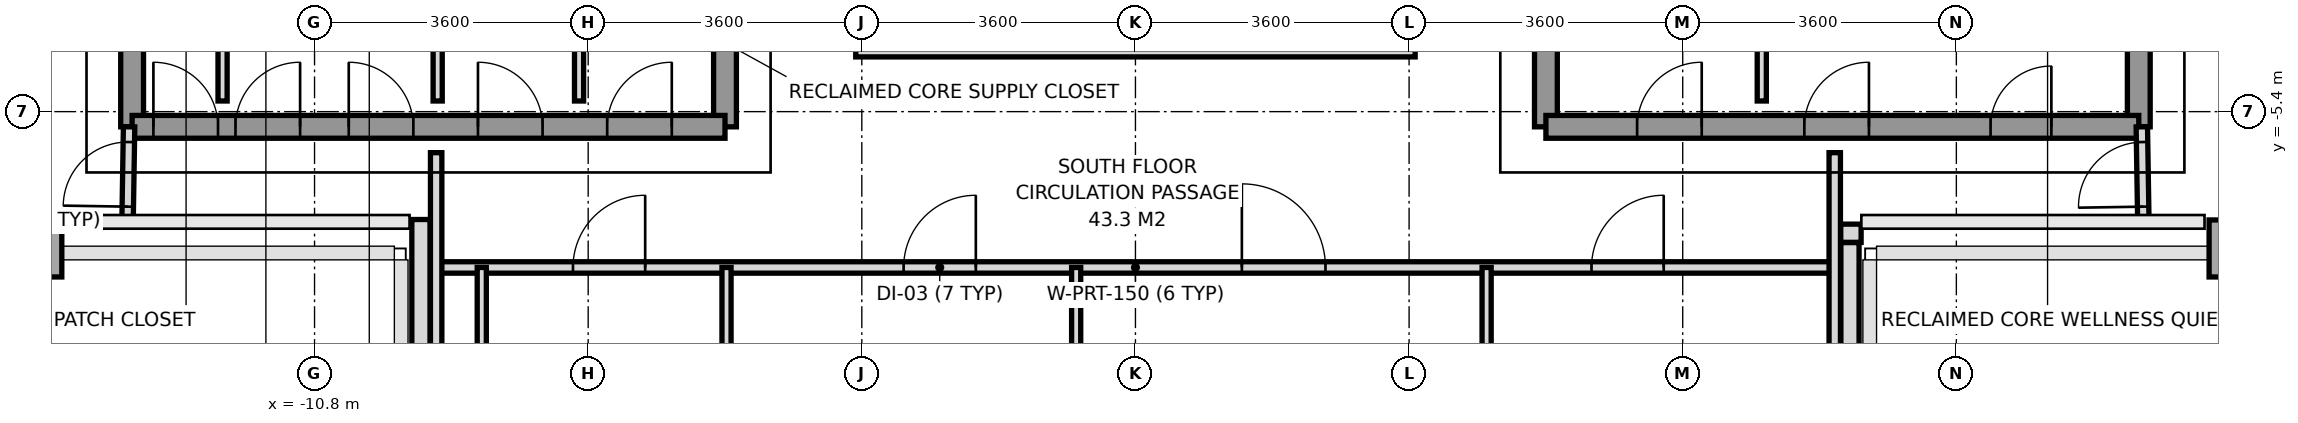
"""IFC4 building model, lengths in metres.
Left out: names, types, materials, properties, quantities, classifications, styles, units other than length and angle.
Written with IfcOpenShell. Run it as: python <this file> out.ifc"""

import sys

from ifc_helpers import new_model, si_unit, direction, frame, frame_2d, origin, origin_2d, place, context, subcontext, project, spatial, rectangle, extrude, source, transform, mapped, element, fill, save


model = new_model("IFC4")
c1 = context("Model", 3, precision=1e-05, world=origin(), true_north=direction((0.0, 1.0)))
c2 = subcontext(c1, "Body", "Model", "MODEL_VIEW")
j1 = project(units=[si_unit("LENGTHUNIT", "METRE"), si_unit("PLANEANGLEUNIT", "RADIAN")], contexts=[c1])
p1 = place(None, origin())
s1 = spatial("IfcSite", under=j1, at=p1, CompositionType="ELEMENT")
p2 = place(p1, origin())
s2 = spatial("IfcBuilding", under=s1, at=p2, CompositionType="ELEMENT")
p3 = place(p2, frame((0.0, 0.0, 226.8)))
s3 = spatial("IfcBuildingStorey", under=s2, at=p3, CompositionType="ELEMENT", Elevation=226.8)
m1 = source(origin(), c2, "Body", "SweptSolid", [
    extrude(rectangle(XDim=0.55, YDim=0.75, at=origin_2d()), origin(), (0.0, 0.0, 1.0), 3.01),
])
for number, where, z_axis, x_axis in (
    (1, (-14.4, -7.2, 0.0), (0.0, 0.0, 1.0), (1.0, 0.0, 0.0)),
    (2, (14.4, -7.2, 0.0), (0.0, 0.0, 1.0), (1.0, 0.0, 0.0)),
):
    element("IfcColumn", number, at=place(p3, frame(where, z_axis=z_axis, x_axis=x_axis)), inside=s3, PredefinedType="COLUMN", context=c2, shape_type="MappedRepresentation", body=[
        mapped(m1, transform((0.0, 0.0, 0.0), x_axis=(1.0, 0.0, 0.0), y_axis=(0.0, 1.0, 0.0), z_axis=(0.0, 0.0, 1.0), scale=1.0)),
    ])
p4 = place(p3, frame((9.547, -7.0, 0.0), z_axis=(0.0, 0.0, 1.0), x_axis=(-1.0, 0.0, 0.0)))
e3 = element("IfcWall", 3, at=p4, inside=s3, PredefinedType="PARAPET", context=c2, shape_type="SweptSolid", body=[
    extrude(rectangle(XDim=0.269, YDim=0.24, at=frame_2d((0.135, 0.0))), origin(), (0.0, 0.0, 1.0), 1.15),
])
p5 = place(p3, frame((9.4, -7.123, 0.0), z_axis=(0.0, 0.0, 1.0), x_axis=(0.0, -1.0, 0.0)))
e4 = element("IfcWall", 4, at=p5, inside=s3, PredefinedType="PARAPET", context=c2, shape_type="SweptSolid", body=[
    extrude(rectangle(XDim=1.499, YDim=0.24, at=frame_2d((0.75, 0.0))), origin(), (0.0, 0.0, 1.0), 1.15),
])
p6 = place(p3, frame((-9.4, -8.622, 0.0), z_axis=(0.0, 0.0, 1.0), x_axis=(0.0, 1.0, 0.0)))
e5 = element("IfcWall", 5, at=p6, inside=s3, PredefinedType="PARAPET", context=c2, shape_type="SweptSolid", body=[
    extrude(rectangle(XDim=1.803, YDim=0.24, at=frame_2d((0.901, 0.0))), origin(), (0.0, 0.0, 1.0), 1.15),
])
p7 = place(p3, frame((-13.2, -5.6, 0.0), z_axis=(0.0, 0.0, 1.0), x_axis=(0.0, 1.0, 0.0)))
e6 = element("IfcWall", 6, at=p7, inside=s3, PredefinedType="SHEAR", context=c2, shape_type="SweptSolid", body=[
    extrude(rectangle(XDim=11.2, YDim=0.3, at=frame_2d((5.6, 0.0))), origin(), (0.0, 0.0, 1.0), 3.01),
])
p8 = place(p3, frame((-5.4, -5.6, 0.0), z_axis=(0.0, 0.0, 1.0), x_axis=(0.0, 1.0, 0.0)))
e7 = element("IfcWall", 7, at=p8, inside=s3, PredefinedType="SHEAR", context=c2, shape_type="SweptSolid", body=[
    extrude(rectangle(XDim=12.5, YDim=0.3, at=frame_2d((6.25, 0.0))), origin(), (0.0, 0.0, 1.0), 3.01),
])
p9 = place(p8, frame((4.55, 0.0, 0.0)))
e8 = element("IfcOpeningElement", 8, at=p9, cuts=e7, PredefinedType="OPENING", context=c2, shape_type="SweptSolid", body=[
    extrude(rectangle(XDim=1.2, YDim=2.2, at=frame_2d((0.6, 1.1))), frame((0.0, 0.16, 0.0), z_axis=(0.0, -1.0, 0.0), x_axis=(1.0, 0.0, 0.0)), (0.0, 0.0, 1.0), 0.32),
])
p10 = place(p8, frame((10.45, 0.0, 0.0)))
e9 = element("IfcOpeningElement", 9, at=p10, cuts=e7, PredefinedType="OPENING", context=c2, shape_type="SweptSolid", body=[
    extrude(rectangle(XDim=1.2, YDim=2.2, at=frame_2d((0.6, 1.1))), frame((0.0, 0.16, 0.0), z_axis=(0.0, -1.0, 0.0), x_axis=(1.0, 0.0, 0.0)), (0.0, 0.0, 1.0), 0.32),
])
p11 = place(p8, frame((6.86, 0.0, 0.0)))
e10 = element("IfcOpeningElement", 10, at=p11, cuts=e7, PredefinedType="OPENING", context=c2, shape_type="SweptSolid", body=[
    extrude(rectangle(XDim=0.8, YDim=2.1, at=frame_2d((0.4, 1.05))), frame((0.0, 0.16, 0.0), z_axis=(0.0, -1.0, 0.0), x_axis=(1.0, 0.0, 0.0)), (0.0, 0.0, 1.0), 0.32),
])
p12 = place(p3, frame((-13.2, -5.6, 0.0), z_axis=(0.0, 0.0, 1.0), x_axis=(1.0, 0.0, 0.0)))
e11 = element("IfcWall", 11, at=p12, inside=s3, PredefinedType="SHEAR", context=c2, shape_type="SweptSolid", body=[
    extrude(rectangle(XDim=7.8, YDim=0.3, at=frame_2d((3.9, 0.0))), origin(), (0.0, 0.0, 1.0), 3.01),
])
p13 = place(p12, frame((0.28, 0.0, 0.0)))
e12 = element("IfcOpeningElement", 12, at=p13, cuts=e11, PredefinedType="OPENING", context=c2, shape_type="SweptSolid", body=[
    extrude(rectangle(XDim=0.85, YDim=2.1, at=frame_2d((0.425, 1.05))), frame((0.0, 0.16, 0.0), z_axis=(0.0, -1.0, 0.0), x_axis=(1.0, 0.0, 0.0)), (0.0, 0.0, 1.0), 0.32),
])
p14 = place(p12, frame((1.36, 0.0, 0.0)))
e13 = element("IfcOpeningElement", 13, at=p14, cuts=e11, PredefinedType="OPENING", context=c2, shape_type="SweptSolid", body=[
    extrude(rectangle(XDim=0.85, YDim=2.1, at=frame_2d((0.425, 1.05))), frame((0.0, 0.16, 0.0), z_axis=(0.0, -1.0, 0.0), x_axis=(1.0, 0.0, 0.0)), (0.0, 0.0, 1.0), 0.32),
])
p15 = place(p12, frame((2.85, 0.0, 0.0)))
e14 = element("IfcOpeningElement", 14, at=p15, cuts=e11, PredefinedType="OPENING", context=c2, shape_type="SweptSolid", body=[
    extrude(rectangle(XDim=0.85, YDim=2.1, at=frame_2d((0.425, 1.05))), frame((0.0, 0.16, 0.0), z_axis=(0.0, -1.0, 0.0), x_axis=(1.0, 0.0, 0.0)), (0.0, 0.0, 1.0), 0.32),
])
p16 = place(p12, frame((4.55, 0.0, 0.0)))
e15 = element("IfcOpeningElement", 15, at=p16, cuts=e11, PredefinedType="OPENING", context=c2, shape_type="SweptSolid", body=[
    extrude(rectangle(XDim=0.85, YDim=2.1, at=frame_2d((0.425, 1.05))), frame((0.0, 0.16, 0.0), z_axis=(0.0, -1.0, 0.0), x_axis=(1.0, 0.0, 0.0)), (0.0, 0.0, 1.0), 0.32),
])
p17 = place(p12, frame((6.25, 0.0, 0.0)))
e16 = element("IfcOpeningElement", 16, at=p17, cuts=e11, PredefinedType="OPENING", context=c2, shape_type="SweptSolid", body=[
    extrude(rectangle(XDim=0.85, YDim=2.1, at=frame_2d((0.425, 1.05))), frame((0.0, 0.16, 0.0), z_axis=(0.0, -1.0, 0.0), x_axis=(1.0, 0.0, 0.0)), (0.0, 0.0, 1.0), 0.32),
])
p18 = place(p3, frame((13.2, -5.6, 0.0), z_axis=(0.0, 0.0, 1.0), x_axis=(0.0, 1.0, 0.0)))
e17 = element("IfcWall", 17, at=p18, inside=s3, PredefinedType="SHEAR", context=c2, shape_type="SweptSolid", body=[
    extrude(rectangle(XDim=11.2, YDim=0.3, at=frame_2d((5.6, 0.0))), origin(), (0.0, 0.0, 1.0), 3.01),
])
p19 = place(p3, frame((5.4, -5.6, 0.0), z_axis=(0.0, 0.0, 1.0), x_axis=(0.0, 1.0, 0.0)))
e18 = element("IfcWall", 18, at=p19, inside=s3, PredefinedType="SHEAR", context=c2, shape_type="SweptSolid", body=[
    extrude(rectangle(XDim=12.5, YDim=0.3, at=frame_2d((6.25, 0.0))), origin(), (0.0, 0.0, 1.0), 3.01),
])
p20 = place(p19, frame((4.55, 0.0, 0.0)))
e19 = element("IfcOpeningElement", 19, at=p20, cuts=e18, PredefinedType="OPENING", context=c2, shape_type="SweptSolid", body=[
    extrude(rectangle(XDim=1.2, YDim=2.2, at=frame_2d((0.6, 1.1))), frame((0.0, 0.16, 0.0), z_axis=(0.0, -1.0, 0.0), x_axis=(1.0, 0.0, 0.0)), (0.0, 0.0, 1.0), 0.32),
])
p21 = place(p19, frame((10.45, 0.0, 0.0)))
e20 = element("IfcOpeningElement", 20, at=p21, cuts=e18, PredefinedType="OPENING", context=c2, shape_type="SweptSolid", body=[
    extrude(rectangle(XDim=1.2, YDim=2.2, at=frame_2d((0.6, 1.1))), frame((0.0, 0.16, 0.0), z_axis=(0.0, -1.0, 0.0), x_axis=(1.0, 0.0, 0.0)), (0.0, 0.0, 1.0), 0.32),
])
p22 = place(p19, frame((6.86, 0.0, 0.0)))
e21 = element("IfcOpeningElement", 21, at=p22, cuts=e18, PredefinedType="OPENING", context=c2, shape_type="SweptSolid", body=[
    extrude(rectangle(XDim=0.8, YDim=2.1, at=frame_2d((0.4, 1.05))), frame((0.0, 0.16, 0.0), z_axis=(0.0, -1.0, 0.0), x_axis=(1.0, 0.0, 0.0)), (0.0, 0.0, 1.0), 0.32),
])
p23 = place(p19, frame((7.88, 0.0, 0.0)))
e22 = element("IfcOpeningElement", 22, at=p23, cuts=e18, PredefinedType="OPENING", context=c2, shape_type="SweptSolid", body=[
    extrude(rectangle(XDim=0.8, YDim=2.1, at=frame_2d((0.4, 1.05))), frame((0.0, 0.16, 0.0), z_axis=(0.0, -1.0, 0.0), x_axis=(1.0, 0.0, 0.0)), (0.0, 0.0, 1.0), 0.32),
])
p24 = place(p3, frame((5.4, -5.6, 0.0), z_axis=(0.0, 0.0, 1.0), x_axis=(1.0, 0.0, 0.0)))
e23 = element("IfcWall", 23, at=p24, inside=s3, PredefinedType="SHEAR", context=c2, shape_type="SweptSolid", body=[
    extrude(rectangle(XDim=7.8, YDim=0.3, at=frame_2d((3.9, 0.0))), origin(), (0.0, 0.0, 1.0), 3.01),
])
p25 = place(p24, frame((5.85, 0.0, 0.0)))
e24 = element("IfcOpeningElement", 24, at=p25, cuts=e23, PredefinedType="OPENING", context=c2, shape_type="SweptSolid", body=[
    extrude(rectangle(XDim=0.8, YDim=2.1, at=frame_2d((0.4, 1.05))), frame((0.0, 0.16, 0.0), z_axis=(0.0, -1.0, 0.0), x_axis=(1.0, 0.0, 0.0)), (0.0, 0.0, 1.0), 0.32),
])
p26 = place(p24, frame((1.2, 0.0, 0.0)))
e25 = element("IfcOpeningElement", 25, at=p26, cuts=e23, PredefinedType="OPENING", context=c2, shape_type="SweptSolid", body=[
    extrude(rectangle(XDim=0.85, YDim=2.1, at=frame_2d((0.425, 1.05))), frame((0.0, 0.16, 0.0), z_axis=(0.0, -1.0, 0.0), x_axis=(1.0, 0.0, 0.0)), (0.0, 0.0, 1.0), 0.32),
])
p27 = place(p24, frame((3.4, 0.0, 0.0)))
e26 = element("IfcOpeningElement", 26, at=p27, cuts=e23, PredefinedType="OPENING", context=c2, shape_type="SweptSolid", body=[
    extrude(rectangle(XDim=0.85, YDim=2.1, at=frame_2d((0.425, 1.05))), frame((0.0, 0.16, 0.0), z_axis=(0.0, -1.0, 0.0), x_axis=(1.0, 0.0, 0.0)), (0.0, 0.0, 1.0), 0.32),
])
for number, where, z_axis, x_axis in (
    (27, (-12.01, -5.26, 0.0), (0.0, 0.0, 1.0), (0.0, 1.0, 0.0)),
    (28, (-9.18, -5.26, 0.0), (0.0, 0.0, 1.0), (0.0, 1.0, 0.0)),
    (29, (-7.32, -5.26, 0.0), (0.0, 0.0, 1.0), (0.0, 1.0, 0.0)),
    (30, (8.24, -5.26, 0.0), (0.0, 0.0, 1.0), (0.0, 1.0, 0.0)),
):
    element("IfcWall", number, at=place(p3, frame(where, z_axis=z_axis, x_axis=x_axis)), inside=s3, PredefinedType="PARTITIONING", context=c2, shape_type="SweptSolid", body=[
        extrude(rectangle(XDim=2.94, YDim=0.12, at=frame_2d((1.47, 0.0))), origin(), (0.0, 0.0, 1.0), 3.01),
    ])
p28 = place(p3, frame((-9.2, -7.45, 0.0), z_axis=(0.0, 0.0, 1.0), x_axis=(1.0, 0.0, 0.0)))
e31 = element("IfcWall", 31, at=p28, inside=s3, PredefinedType="PARTITIONING", context=c2, shape_type="SweptSolid", body=[
    extrude(rectangle(XDim=18.4, YDim=0.15, at=frame_2d((9.2, 0.0))), origin(), (0.0, 0.0, 1.0), 2.57),
])
p29 = place(p28, frame((1.8, 0.0, 0.0)))
e32 = element("IfcOpeningElement", 32, at=p29, cuts=e31, PredefinedType="OPENING", context=c2, shape_type="SweptSolid", body=[
    extrude(rectangle(XDim=0.95, YDim=2.15, at=frame_2d((0.475, 1.075))), frame((0.0, 0.085, 0.0), z_axis=(0.0, -1.0, 0.0), x_axis=(1.0, 0.0, 0.0)), (0.0, 0.0, 1.0), 0.17),
])
p30 = place(p28, frame((6.15, 0.0, 0.0)))
e33 = element("IfcOpeningElement", 33, at=p30, cuts=e31, PredefinedType="OPENING", context=c2, shape_type="SweptSolid", body=[
    extrude(rectangle(XDim=0.95, YDim=2.15, at=frame_2d((0.475, 1.075))), frame((0.0, 0.085, 0.0), z_axis=(0.0, -1.0, 0.0), x_axis=(1.0, 0.0, 0.0)), (0.0, 0.0, 1.0), 0.17),
])
p31 = place(p28, frame((10.6, 0.0, 0.0)))
e34 = element("IfcOpeningElement", 34, at=p31, cuts=e31, PredefinedType="OPENING", context=c2, shape_type="SweptSolid", body=[
    extrude(rectangle(XDim=1.1, YDim=2.2, at=frame_2d((0.55, 1.1))), frame((0.0, 0.085, 0.0), z_axis=(0.0, -1.0, 0.0), x_axis=(1.0, 0.0, 0.0)), (0.0, 0.0, 1.0), 0.17),
])
p32 = place(p28, frame((15.2, 0.0, 0.0)))
e35 = element("IfcOpeningElement", 35, at=p32, cuts=e31, PredefinedType="OPENING", context=c2, shape_type="SweptSolid", body=[
    extrude(rectangle(XDim=0.95, YDim=2.15, at=frame_2d((0.475, 1.075))), frame((0.0, 0.085, 0.0), z_axis=(0.0, -1.0, 0.0), x_axis=(1.0, 0.0, 0.0)), (0.0, 0.0, 1.0), 0.17),
])
for number, where, z_axis, x_axis in (
    (36, (-9.2, -10.28, 0.0), (0.0, 0.0, 1.0), (0.0, 1.0, 0.0)),
    (37, (9.2, -10.28, 0.0), (0.0, 0.0, 1.0), (0.0, 1.0, 0.0)),
):
    element("IfcWall", number, at=place(p3, frame(where, z_axis=z_axis, x_axis=x_axis)), inside=s3, PredefinedType="PARTITIONING", context=c2, shape_type="SweptSolid", body=[
        extrude(rectangle(XDim=4.34, YDim=0.15, at=frame_2d((2.17, 0.0))), origin(), (0.0, 0.0, 1.0), 2.61),
    ])
p33 = place(p3, frame((-5.38, -19.25, 0.0), z_axis=(0.0, 0.0, 1.0), x_axis=(0.0, 1.0, 0.0)))
e38 = element("IfcWall", 38, at=p33, inside=s3, PredefinedType="PARTITIONING", context=c2, shape_type="SweptSolid", body=[
    extrude(rectangle(XDim=11.8, YDim=0.12, at=frame_2d((5.9, 0.0))), origin(), (0.0, 0.0, 1.0), 2.61),
])
p34 = place(p33, frame((3.2, 0.0, 0.0)))
e39 = element("IfcOpeningElement", 39, at=p34, cuts=e38, PredefinedType="OPENING", context=c2, shape_type="SweptSolid", body=[
    extrude(rectangle(XDim=0.95, YDim=2.15, at=frame_2d((0.475, 1.075))), frame((0.0, 0.07, 0.0), z_axis=(0.0, -1.0, 0.0), x_axis=(1.0, 0.0, 0.0)), (0.0, 0.0, 1.0), 0.14),
])
for number, where, z_axis, x_axis in (
    (40, (-0.78, -19.25, 0.0), (0.0, 0.0, 1.0), (0.0, 1.0, 0.0)),
    (41, (4.62, -19.25, 0.0), (0.0, 0.0, 1.0), (0.0, 1.0, 0.0)),
):
    element("IfcWall", number, at=place(p3, frame(where, z_axis=z_axis, x_axis=x_axis)), inside=s3, PredefinedType="PARTITIONING", context=c2, shape_type="SweptSolid", body=[
        extrude(rectangle(XDim=11.8, YDim=0.12, at=frame_2d((5.9, 0.0))), origin(), (0.0, 0.0, 1.0), 2.61),
    ])
p35 = place(p3, frame((-8.6, -11.05, 0.0), z_axis=(0.0, 0.0, 1.0), x_axis=(0.0, 1.0, 0.0)))
e42 = element("IfcWall", 42, at=p35, inside=s3, PredefinedType="PARTITIONING", context=c2, shape_type="SweptSolid", body=[
    extrude(rectangle(XDim=3.6, YDim=0.12, at=frame_2d((1.8, 0.0))), origin(), (0.0, 0.0, 1.0), 2.61),
])
p36 = place(p3, frame((-13.26, -6.85, 0.0), z_axis=(0.0, 0.0, 1.0), x_axis=(0.016013571389, 0.999871774545, 0.0)))
e43 = element("IfcWall", 43, at=p36, inside=s3, PredefinedType="PARTITIONING", context=c2, shape_type="SweptSolid", body=[
    extrude(rectangle(XDim=1.25, YDim=0.15, at=frame_2d((0.625, 0.0))), origin(), (0.0, 0.0, 1.0), 3.01),
])
p37 = place(p36, frame((0.2, 0.0, 0.0)))
e44 = element("IfcOpeningElement", 44, at=p37, cuts=e43, PredefinedType="OPENING", context=c2, shape_type="SweptSolid", body=[
    extrude(rectangle(XDim=0.85, YDim=2.1, at=frame_2d((0.425, 1.05))), frame((0.0, 0.085, 0.0), z_axis=(0.0, -1.0, 0.0), x_axis=(1.0, 0.0, 0.0)), (0.0, 0.0, 1.0), 0.17),
])
p38 = place(p3, frame((13.26, -6.85, 0.0), z_axis=(0.0, 0.0, 1.0), x_axis=(-0.016013571389, 0.999871774545, 0.0)))
e45 = element("IfcWall", 45, at=p38, inside=s3, PredefinedType="PARTITIONING", context=c2, shape_type="SweptSolid", body=[
    extrude(rectangle(XDim=1.25, YDim=0.15, at=frame_2d((0.625, 0.0))), origin(), (0.0, 0.0, 1.0), 3.01),
])
p39 = place(p38, frame((0.2, 0.0, 0.0)))
e46 = element("IfcOpeningElement", 46, at=p39, cuts=e45, PredefinedType="OPENING", context=c2, shape_type="SweptSolid", body=[
    extrude(rectangle(XDim=0.85, YDim=2.1, at=frame_2d((0.425, 1.05))), frame((0.0, 0.085, 0.0), z_axis=(0.0, -1.0, 0.0), x_axis=(1.0, 0.0, 0.0)), (0.0, 0.0, 1.0), 0.17),
])
p40 = place(p3, frame((-3.68, -4.56, 0.0), z_axis=(0.0, 0.0, 1.0), x_axis=(1.0, 0.0, 0.0)))
e47 = element("IfcWall", 47, at=p40, inside=s3, PredefinedType="PARAPET", context=c2, shape_type="SweptSolid", body=[
    extrude(rectangle(XDim=7.36, YDim=0.24, at=frame_2d((3.68, 0.0))), origin(), (0.0, 0.0, 1.0), 1.15),
])
m2 = source(origin(), c2, "Body", "SweptSolid", [
    extrude(rectangle(XDim=0.85, YDim=2.1, at=frame_2d((0.425, 1.05))), frame((0.0, 0.025, 0.0), z_axis=(0.0, -1.0, 0.0), x_axis=(1.0, 0.0, 0.0)), (0.0, 0.0, 1.0), 0.05),
])
p41 = place(p13, origin())
e48 = element("IfcDoor", 48, at=p41, inside=s3, OperationType="SINGLE_SWING_LEFT", PredefinedType="DOOR", context=c2, shape_type="MappedRepresentation", body=[
    mapped(m2, transform((0.0, 0.0, 0.0), x_axis=(1.0, 0.0, 0.0), y_axis=(0.0, 1.0, 0.0), z_axis=(0.0, 0.0, 1.0), scale=1.0)),
])
fill(e12, e48)
p42 = place(p14, origin())
e49 = element("IfcDoor", 49, at=p42, inside=s3, OperationType="SINGLE_SWING_RIGHT", PredefinedType="DOOR", context=c2, shape_type="MappedRepresentation", body=[
    mapped(m2, transform((0.0, 0.0, 0.0), x_axis=(1.0, 0.0, 0.0), y_axis=(0.0, 1.0, 0.0), z_axis=(0.0, 0.0, 1.0), scale=1.0)),
])
fill(e13, e49)
m3 = source(origin(), c2, "Body", "SweptSolid", [
    extrude(rectangle(XDim=0.8, YDim=2.1, at=frame_2d((0.4, 1.05))), frame((0.0, 0.025, 0.0), z_axis=(0.0, -1.0, 0.0), x_axis=(1.0, 0.0, 0.0)), (0.0, 0.0, 1.0), 0.05),
])
p43 = place(p25, origin())
e50 = element("IfcDoor", 50, at=p43, inside=s3, OperationType="SINGLE_SWING_RIGHT", PredefinedType="DOOR", context=c2, shape_type="MappedRepresentation", body=[
    mapped(m3, transform((0.0, 0.0, 0.0), x_axis=(1.0, 0.0, 0.0), y_axis=(0.0, 1.0, 0.0), z_axis=(0.0, 0.0, 1.0), scale=1.0)),
])
fill(e24, e50)
p44 = place(p15, origin())
e51 = element("IfcDoor", 51, at=p44, inside=s3, OperationType="SINGLE_SWING_LEFT", PredefinedType="DOOR", context=c2, shape_type="MappedRepresentation", body=[
    mapped(m2, transform((0.0, 0.0, 0.0), x_axis=(1.0, 0.0, 0.0), y_axis=(0.0, 1.0, 0.0), z_axis=(0.0, 0.0, 1.0), scale=1.0)),
])
fill(e14, e51)
p45 = place(p16, origin())
e52 = element("IfcDoor", 52, at=p45, inside=s3, OperationType="SINGLE_SWING_LEFT", PredefinedType="DOOR", context=c2, shape_type="MappedRepresentation", body=[
    mapped(m2, transform((0.0, 0.0, 0.0), x_axis=(1.0, 0.0, 0.0), y_axis=(0.0, 1.0, 0.0), z_axis=(0.0, 0.0, 1.0), scale=1.0)),
])
fill(e15, e52)
p46 = place(p17, origin())
e53 = element("IfcDoor", 53, at=p46, inside=s3, OperationType="SINGLE_SWING_RIGHT", PredefinedType="DOOR", context=c2, shape_type="MappedRepresentation", body=[
    mapped(m2, transform((0.0, 0.0, 0.0), x_axis=(1.0, 0.0, 0.0), y_axis=(0.0, 1.0, 0.0), z_axis=(0.0, 0.0, 1.0), scale=1.0)),
])
fill(e16, e53)
p47 = place(p26, origin())
e54 = element("IfcDoor", 54, at=p47, inside=s3, OperationType="SINGLE_SWING_RIGHT", PredefinedType="DOOR", context=c2, shape_type="MappedRepresentation", body=[
    mapped(m2, transform((0.0, 0.0, 0.0), x_axis=(1.0, 0.0, 0.0), y_axis=(0.0, 1.0, 0.0), z_axis=(0.0, 0.0, 1.0), scale=1.0)),
])
fill(e25, e54)
p48 = place(p27, origin())
e55 = element("IfcDoor", 55, at=p48, inside=s3, OperationType="SINGLE_SWING_RIGHT", PredefinedType="DOOR", context=c2, shape_type="MappedRepresentation", body=[
    mapped(m2, transform((0.0, 0.0, 0.0), x_axis=(1.0, 0.0, 0.0), y_axis=(0.0, 1.0, 0.0), z_axis=(0.0, 0.0, 1.0), scale=1.0)),
])
fill(e26, e55)
m4 = source(origin(), c2, "Body", "SweptSolid", [
    extrude(rectangle(XDim=0.95, YDim=2.15, at=frame_2d((0.475, 1.075))), frame((0.0, 0.025, 0.0), z_axis=(0.0, -1.0, 0.0), x_axis=(1.0, 0.0, 0.0)), (0.0, 0.0, 1.0), 0.05),
])
p49 = place(p29, origin())
e56 = element("IfcDoor", 56, at=p49, inside=s3, OperationType="SINGLE_SWING_RIGHT", PredefinedType="DOOR", context=c2, shape_type="MappedRepresentation", body=[
    mapped(m4, transform((0.0, 0.0, 0.0), x_axis=(1.0, 0.0, 0.0), y_axis=(0.0, 1.0, 0.0), z_axis=(0.0, 0.0, 1.0), scale=1.0)),
])
fill(e32, e56)
p50 = place(p30, origin())
e57 = element("IfcDoor", 57, at=p50, inside=s3, OperationType="SINGLE_SWING_RIGHT", PredefinedType="DOOR", context=c2, shape_type="MappedRepresentation", body=[
    mapped(m4, transform((0.0, 0.0, 0.0), x_axis=(1.0, 0.0, 0.0), y_axis=(0.0, 1.0, 0.0), z_axis=(0.0, 0.0, 1.0), scale=1.0)),
])
fill(e33, e57)
m5 = source(origin(), c2, "Body", "SweptSolid", [
    extrude(rectangle(XDim=1.1, YDim=2.2, at=frame_2d((0.55, 1.1))), frame((0.0, 0.025, 0.0), z_axis=(0.0, -1.0, 0.0), x_axis=(1.0, 0.0, 0.0)), (0.0, 0.0, 1.0), 0.05),
])
p51 = place(p31, origin())
e58 = element("IfcDoor", 58, at=p51, inside=s3, OperationType="SINGLE_SWING_LEFT", PredefinedType="DOOR", context=c2, shape_type="MappedRepresentation", body=[
    mapped(m5, transform((0.0, 0.0, 0.0), x_axis=(1.0, 0.0, 0.0), y_axis=(0.0, 1.0, 0.0), z_axis=(0.0, 0.0, 1.0), scale=1.0)),
])
fill(e34, e58)
p52 = place(p32, origin())
e59 = element("IfcDoor", 59, at=p52, inside=s3, OperationType="SINGLE_SWING_RIGHT", PredefinedType="DOOR", context=c2, shape_type="MappedRepresentation", body=[
    mapped(m4, transform((0.0, 0.0, 0.0), x_axis=(1.0, 0.0, 0.0), y_axis=(0.0, 1.0, 0.0), z_axis=(0.0, 0.0, 1.0), scale=1.0)),
])
fill(e35, e59)
p53 = place(p37, origin())
e60 = element("IfcDoor", 60, at=p53, inside=s3, OperationType="SINGLE_SWING_LEFT", PredefinedType="DOOR", context=c2, shape_type="MappedRepresentation", body=[
    mapped(m2, transform((0.0, 0.0, 0.0), x_axis=(1.0, 0.0, 0.0), y_axis=(0.0, 1.0, 0.0), z_axis=(0.0, 0.0, 1.0), scale=1.0)),
])
fill(e44, e60)
p54 = place(p39, origin())
e61 = element("IfcDoor", 61, at=p54, inside=s3, OperationType="SINGLE_SWING_LEFT", PredefinedType="DOOR", context=c2, shape_type="MappedRepresentation", body=[
    mapped(m2, transform((0.0, 0.0, 0.0), x_axis=(1.0, 0.0, 0.0), y_axis=(0.0, 1.0, 0.0), z_axis=(0.0, 0.0, 1.0), scale=1.0)),
])
fill(e46, e61)
save(model, sys.argv[1])
